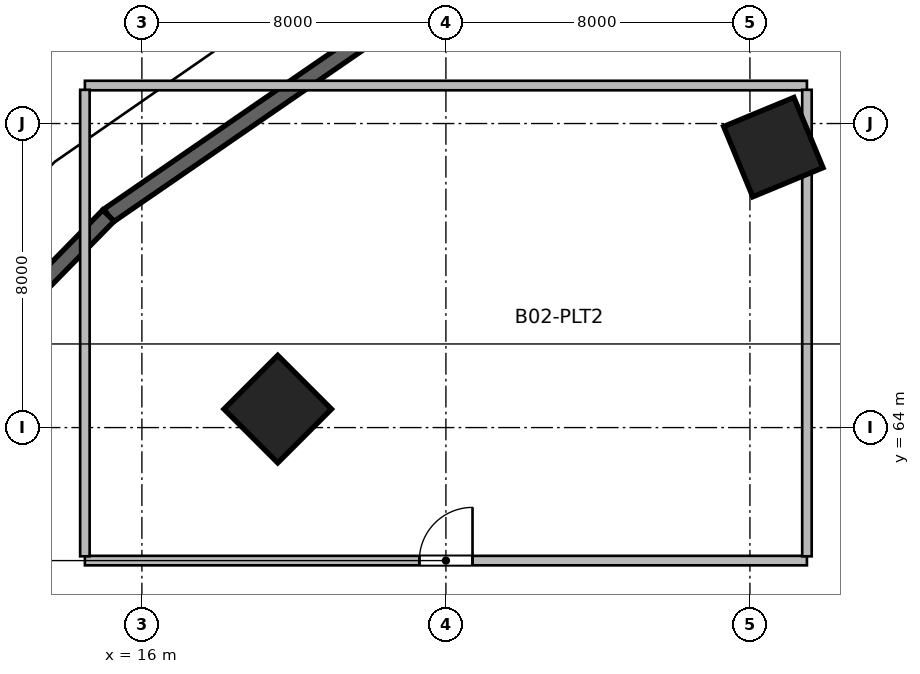
"""IFC4 building model, lengths in metres.
Left out: names, types, materials, properties, quantities, classifications, styles, units other than length and angle.
Written with IfcOpenShell. Run it as: python <this file> out.ifc"""

import sys

from ifc_helpers import new_model, si_unit, direction, frame, frame_2d, origin, origin_2d, place, context, subcontext, project, spatial, rectangle, extrude, source, transform, mapped, element, fill, save


model = new_model("IFC4")
c1 = context("Model", 3, precision=1e-05, world=origin(), true_north=direction((0.0, 1.0)))
c2 = subcontext(c1, "Body", "Model", "MODEL_VIEW")
j1 = project(units=[si_unit("LENGTHUNIT", "METRE"), si_unit("PLANEANGLEUNIT", "RADIAN")], contexts=[c1])
p1 = place(None, origin())
s1 = spatial("IfcSite", under=j1, at=p1, CompositionType="ELEMENT")
p2 = place(p1, origin())
s2 = spatial("IfcBuilding", under=s1, at=p2, CompositionType="ELEMENT")
p3 = place(p2, frame((0.0, 0.0, -10.0)))
s3 = spatial("IfcBuildingStorey", under=s2, at=p3, CompositionType="ELEMENT", Elevation=-10.0)
m1 = source(origin(), c2, "Body", "SweptSolid", [
    extrude(rectangle(XDim=8.554, YDim=0.42, at=frame_2d((4.277, 0.0))), origin(), (0.0, 0.0, 1.0), 5.0),
])
p4 = place(p3, frame((22.166, 74.427, 0.0), z_axis=(0.0, 0.0, 1.0), x_axis=(-0.823739529001, -0.566968419192, 0.0)))
e1 = element("IfcWall", 1, at=p4, inside=s3, PredefinedType="USERDEFINED", context=c2, shape_type="MappedRepresentation", body=[
    mapped(m1, transform((0.0, 0.0, 0.0), scale=1.0)),
])
m2 = source(origin(), c2, "Body", "SweptSolid", [
    extrude(rectangle(XDim=8.268, YDim=0.42, at=frame_2d((4.134, 0.0))), origin(), (0.0, 0.0, 1.0), 5.0),
])
p5 = place(p3, frame((15.119, 69.577, 0.0), z_axis=(0.0, 0.0, 1.0), x_axis=(-0.699373198463, -0.714756692358, 0.0)))
e2 = element("IfcWall", 2, at=p5, inside=s3, PredefinedType="USERDEFINED", context=c2, shape_type="MappedRepresentation", body=[
    mapped(m2, transform((0.0, 0.0, 0.0), scale=1.0)),
])
m3 = source(origin(), c2, "Body", "SweptSolid", [
    extrude(rectangle(XDim=2.0, YDim=2.0, at=origin_2d()), origin(), (0.0, 0.0, 1.0), 5.0),
])
for number, where, z_axis, x_axis in (
    (3, (32.616, 71.379, 0.0), (0.0, 0.0, 1.0), (-0.383, 0.924, 0.0)),
    (4, (19.574, 64.486, 0.0), (0.0, 0.0, 1.0), (-0.707, 0.707, 0.0)),
):
    element("IfcColumn", number, at=place(p3, frame(where, z_axis=z_axis, x_axis=x_axis)), inside=s3, PredefinedType="COLUMN", context=c2, shape_type="MappedRepresentation", body=[
        mapped(m3, transform((0.0, 0.0, 0.0), scale=1.0)),
    ])
m4 = source(origin(), c2, "Body", "SweptSolid", [
    extrude(rectangle(XDim=19.0, YDim=0.25, at=frame_2d((9.5, 0.0))), origin(), (0.0, 0.0, 1.0), 4.7),
])
p6 = place(p3, frame((14.5, 60.5, 0.0), z_axis=(0.0, 0.0, 1.0), x_axis=(1.0, 0.0, 0.0)))
e5 = element("IfcWall", 5, at=p6, inside=s3, PredefinedType="PARTITIONING", context=c2, shape_type="MappedRepresentation", body=[
    mapped(m4, transform((0.0, 0.0, 0.0), scale=1.0)),
])
p7 = place(p6, frame((8.8, 0.0, 0.0)))
e6 = element("IfcOpeningElement", 6, at=p7, cuts=e5, PredefinedType="OPENING", context=c2, shape_type="SweptSolid", body=[
    extrude(rectangle(XDim=1.4, YDim=2.15, at=frame_2d((0.7, 1.075))), frame((0.0, 0.135, 0.0), z_axis=(0.0, -1.0, 0.0), x_axis=(1.0, 0.0, 0.0)), (0.0, 0.0, 1.0), 0.27),
])
p8 = place(p3, frame((14.5, 73.0, 0.0), z_axis=(0.0, 0.0, 1.0), x_axis=(1.0, 0.0, 0.0)))
e7 = element("IfcWall", 7, at=p8, inside=s3, PredefinedType="PARTITIONING", context=c2, shape_type="MappedRepresentation", body=[
    mapped(m4, transform((0.0, 0.0, 0.0), scale=1.0)),
])
m5 = source(origin(), c2, "Body", "SweptSolid", [
    extrude(rectangle(XDim=12.275, YDim=0.25, at=frame_2d((6.137, 0.0))), origin(), (0.0, 0.0, 1.0), 4.7),
])
for number, where, z_axis, x_axis in (
    (8, (14.5, 60.613, 0.0), (0.0, 0.0, 1.0), (0.0, 1.0, 0.0)),
    (9, (33.5, 60.613, 0.0), (0.0, 0.0, 1.0), (0.0, 1.0, 0.0)),
):
    element("IfcWall", number, at=place(p3, frame(where, z_axis=z_axis, x_axis=x_axis)), inside=s3, PredefinedType="PARTITIONING", context=c2, shape_type="MappedRepresentation", body=[
        mapped(m5, transform((0.0, 0.0, 0.0), scale=1.0)),
    ])
m6 = source(origin(), c2, "Body", "SweptSolid", [
    extrude(rectangle(XDim=1.4, YDim=2.15, at=frame_2d((0.7, 1.075))), frame((0.0, 0.025, 0.0), z_axis=(0.0, -1.0, 0.0), x_axis=(1.0, 0.0, 0.0)), (0.0, 0.0, 1.0), 0.05),
])
p9 = place(p7, origin())
e10 = element("IfcDoor", 10, at=p9, inside=s3, OperationType="SINGLE_SWING_RIGHT", PredefinedType="DOOR", context=c2, shape_type="MappedRepresentation", body=[
    mapped(m6, transform((0.0, 0.0, 0.0), scale=1.0)),
])
fill(e6, e10)
save(model, sys.argv[1])
